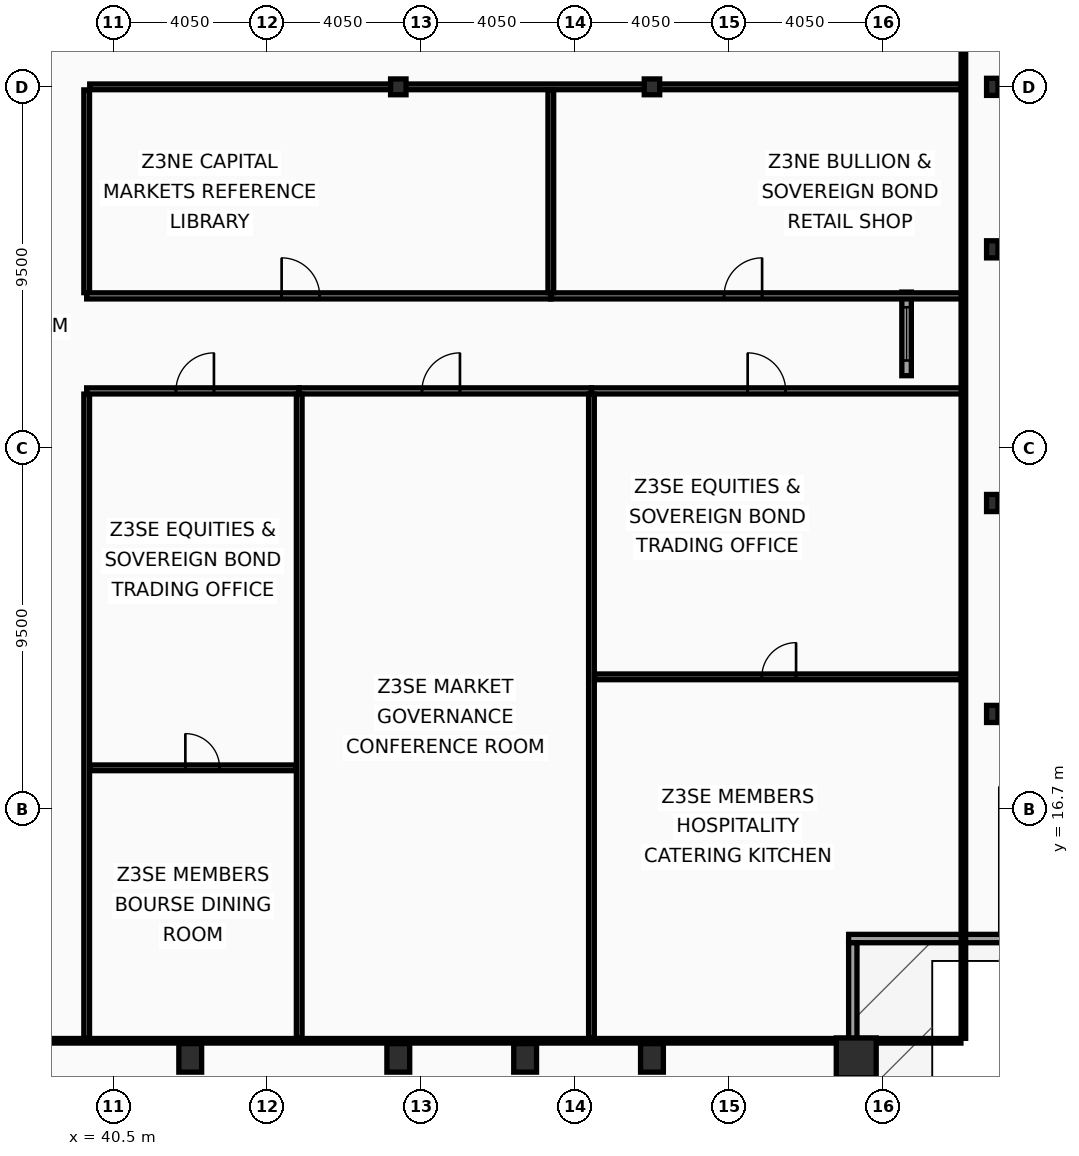
"""IFC4 building model, lengths in metres.
Left out: names, types, materials, properties, quantities, classifications, styles, units other than length and angle.
Written with IfcOpenShell. Run it as: python <this file> out.ifc"""

import sys

from ifc_helpers import new_model, si_unit, direction, frame, frame_2d, origin, origin_2d, place, context, subcontext, project, spatial, rectangle, hollow_rectangle, i_section, extrude, element, fill, save


model = new_model("IFC4")
c1 = context("Model", 3, precision=1e-05, world=origin(), true_north=direction((0.0, 1.0)))
c2 = subcontext(c1, "Body", "Model", "MODEL_VIEW")
j1 = project(units=[si_unit("LENGTHUNIT", "METRE"), si_unit("PLANEANGLEUNIT", "RADIAN")], contexts=[c1])
p1 = place(None, origin())
s1 = spatial("IfcSite", under=j1, at=p1, CompositionType="ELEMENT")
p2 = place(p1, origin())
s2 = spatial("IfcBuilding", under=s1, at=p2, CompositionType="ELEMENT")
p3 = place(p2, frame((0.0, 0.0, 239.0)))
s3 = spatial("IfcBuildingStorey", under=s2, at=p3, CompositionType="ELEMENT", Elevation=239.0)
p4 = place(p3, frame((60.05, 10.15, 0.0), z_axis=(0.0, 0.0, 1.0), x_axis=(1.0, 0.0, 0.0)))
e1 = element("IfcColumn", 1, at=p4, inside=s3, PredefinedType="COLUMN", context=c2, shape_type="SweptSolid", body=[
    extrude(hollow_rectangle(XDim=1.05, YDim=1.05, WallThickness=0.055, at=origin_2d()), origin(), (0.0, 0.0, 1.0), 3.6),
])
for number, where, z_axis, x_axis in (
    (2, (42.525, 10.15, 0.0), (0.0, 0.0, 1.0), (1.0, 0.0, 0.0)),
    (3, (48.0, 10.15, 0.0), (0.0, 0.0, 1.0), (1.0, 0.0, 0.0)),
    (4, (51.337, 10.15, 0.0), (0.0, 0.0, 1.0), (1.0, 0.0, 0.0)),
    (5, (54.675, 10.15, 0.0), (0.0, 0.0, 1.0), (1.0, 0.0, 0.0)),
):
    element("IfcColumn", number, at=place(p3, frame(where, z_axis=z_axis, x_axis=x_axis)), inside=s3, PredefinedType="COLUMN", context=c2, shape_type="SweptSolid", body=[
        extrude(hollow_rectangle(XDim=0.6, YDim=0.75, WallThickness=0.045, at=origin_2d()), origin(), (0.0, 0.0, 1.0), 3.6),
    ])
for number, where, z_axis, x_axis in (
    (6, (63.63, 19.2, 0.0), (0.0, 0.0, 1.0), (1.0, 0.0, 0.0)),
    (7, (63.63, 24.75, 0.0), (0.0, 0.0, 1.0), (1.0, 0.0, 0.0)),
    (8, (63.63, 31.425, 0.0), (0.0, 0.0, 1.0), (1.0, 0.0, 0.0)),
    (9, (63.63, 35.7, 0.0), (0.0, 0.0, 1.0), (1.0, 0.0, 0.0)),
):
    element("IfcColumn", number, at=place(p3, frame(where, z_axis=z_axis, x_axis=x_axis)), inside=s3, PredefinedType="COLUMN", context=c2, shape_type="SweptSolid", body=[
        extrude(i_section(OverallWidth=0.3, OverallDepth=0.45, WebThickness=0.014, FlangeThickness=0.026, at=origin_2d()), origin(), (0.0, 0.0, 1.0), 3.6),
    ])
for number, where, z_axis, x_axis in (
    (10, (48.0, 35.7, 0.0), (0.0, 0.0, 1.0), (1.0, 0.0, 0.0)),
    (11, (54.675, 35.7, 0.0), (0.0, 0.0, 1.0), (1.0, 0.0, 0.0)),
):
    element("IfcColumn", number, at=place(p3, frame(where, z_axis=z_axis, x_axis=x_axis)), inside=s3, PredefinedType="COLUMN", context=c2, shape_type="SweptSolid", body=[
        extrude(i_section(OverallWidth=0.406, OverallDepth=0.416, WebThickness=0.03, FlangeThickness=0.048, at=origin_2d()), origin(), (0.0, 0.0, 1.0), 3.6),
    ])
p5 = place(p3, frame((64.07, 13.29, 0.0), z_axis=(0.0, 0.0, 1.0), x_axis=(-1.0, 0.0, 0.0)))
e12 = element("IfcWall", 12, at=p5, inside=s3, PredefinedType="SOLIDWALL", context=c2, shape_type="SweptSolid", body=[
    extrude(rectangle(XDim=4.22, YDim=0.22, at=frame_2d((2.11, 0.0))), origin(), (0.0, 0.0, 1.0), 2.83),
])
p6 = place(p3, frame((59.96, 13.18, 0.0), z_axis=(0.0, 0.0, 1.0), x_axis=(0.0, -1.0, 0.0)))
e13 = element("IfcWall", 13, at=p6, inside=s3, PredefinedType="SOLIDWALL", context=c2, shape_type="SweptSolid", body=[
    extrude(rectangle(XDim=3.91, YDim=0.22, at=frame_2d((1.955, 0.0))), origin(), (0.0, 0.0, 1.0), 2.83),
])
p7 = place(p3, frame((61.375, 28.1, 0.0), z_axis=(0.0, 0.0, 1.0), x_axis=(0.0, 1.0, 0.0)))
e14 = element("IfcWall", 14, at=p7, inside=s3, PredefinedType="PARAPET", context=c2, shape_type="SweptSolid", body=[
    extrude(rectangle(XDim=2.2, YDim=0.25, at=frame_2d((1.1, 0.0))), origin(), (0.0, 0.0, 1.0), 0.88),
])
p8 = place(p7, frame((0.4, 0.0, 0.16)))
e15 = element("IfcOpeningElement", 15, at=p8, cuts=e14, PredefinedType="OPENING", context=c2, shape_type="SweptSolid", body=[
    extrude(rectangle(XDim=1.4, YDim=0.5, at=frame_2d((0.7, 0.25))), frame((0.0, 0.135, 0.0), z_axis=(0.0, -1.0, 0.0), x_axis=(1.0, 0.0, 0.0)), (0.0, 0.0, 1.0), 0.27),
])
p9 = place(p3, frame((39.8, 10.665, 0.0), z_axis=(0.0, 0.0, 1.0), x_axis=(0.0, 1.0, 0.0)))
e16 = element("IfcWall", 16, at=p9, inside=s3, PredefinedType="PARTITIONING", context=c2, shape_type="SweptSolid", body=[
    extrude(rectangle(XDim=16.95, YDim=0.15, at=frame_2d((8.475, 0.0))), origin(), (0.0, 0.0, 1.0), 2.98),
])
p10 = place(p3, frame((39.8, 30.285, 0.0), z_axis=(0.0, 0.0, 1.0), x_axis=(0.0, 1.0, 0.0)))
e17 = element("IfcWall", 17, at=p10, inside=s3, PredefinedType="PARTITIONING", context=c2, shape_type="SweptSolid", body=[
    extrude(rectangle(XDim=5.335, YDim=0.15, at=frame_2d((2.667, 0.0))), origin(), (0.0, 0.0, 1.0), 2.98),
])
p11 = place(p3, frame((39.88, 35.7, 0.0), z_axis=(0.0, 0.0, 1.0), x_axis=(1.0, 0.0, 0.0)))
e18 = element("IfcWall", 18, at=p11, inside=s3, PredefinedType="PARTITIONING", context=c2, shape_type="SweptSolid", body=[
    extrude(rectangle(XDim=22.925, YDim=0.15, at=frame_2d((11.462, 0.0))), origin(), (0.0, 0.0, 1.0), 2.78),
])
p12 = place(p3, frame((39.8, 27.7, 0.0), z_axis=(0.0, 0.0, 1.0), x_axis=(1.0, 0.0, 0.0)))
e19 = element("IfcWall", 19, at=p12, inside=s3, PredefinedType="PARTITIONING", context=c2, shape_type="SweptSolid", body=[
    extrude(rectangle(XDim=5.593, YDim=0.16, at=frame_2d((2.796, 0.0))), origin(), (0.0, 0.0, 1.0), 2.78),
])
p13 = place(p12, frame((2.349, 0.0, 0.0)))
e20 = element("IfcOpeningElement", 20, at=p13, cuts=e19, PredefinedType="OPENING", context=c2, shape_type="SweptSolid", body=[
    extrude(rectangle(XDim=1.0, YDim=2.05, at=frame_2d((0.5, 1.025))), frame((0.0, 0.09, 0.0), z_axis=(0.0, -1.0, 0.0), x_axis=(1.0, 0.0, 0.0)), (0.0, 0.0, 1.0), 0.18),
])
p14 = place(p3, frame((39.88, 17.782, 0.0), z_axis=(0.0, 0.0, 1.0), x_axis=(1.0, 0.0, 0.0)))
e21 = element("IfcWall", 21, at=p14, inside=s3, PredefinedType="PARTITIONING", context=c2, shape_type="SweptSolid", body=[
    extrude(rectangle(XDim=5.433, YDim=0.15, at=frame_2d((2.716, 0.0))), origin(), (0.0, 0.0, 1.0), 2.78),
])
p15 = place(p14, frame((2.517, 0.0, 0.0)))
e22 = element("IfcOpeningElement", 22, at=p15, cuts=e21, PredefinedType="OPENING", context=c2, shape_type="SweptSolid", body=[
    extrude(rectangle(XDim=0.9, YDim=2.05, at=frame_2d((0.45, 1.025))), frame((0.0, 0.085, 0.0), z_axis=(0.0, -1.0, 0.0), x_axis=(1.0, 0.0, 0.0)), (0.0, 0.0, 1.0), 0.17),
])
p16 = place(p3, frame((45.393, 27.7, 0.0), z_axis=(0.0, 0.0, 1.0), x_axis=(1.0, 0.0, 0.0)))
e23 = element("IfcWall", 23, at=p16, inside=s3, PredefinedType="PARTITIONING", context=c2, shape_type="SweptSolid", body=[
    extrude(rectangle(XDim=7.69, YDim=0.16, at=frame_2d((3.845, 0.0))), origin(), (0.0, 0.0, 1.0), 2.78),
])
p17 = place(p16, frame((3.23, 0.0, 0.0)))
e24 = element("IfcOpeningElement", 24, at=p17, cuts=e23, PredefinedType="OPENING", context=c2, shape_type="SweptSolid", body=[
    extrude(rectangle(XDim=1.0, YDim=2.05, at=frame_2d((0.5, 1.025))), frame((0.0, 0.09, 0.0), z_axis=(0.0, -1.0, 0.0), x_axis=(1.0, 0.0, 0.0)), (0.0, 0.0, 1.0), 0.18),
])
p18 = place(p3, frame((45.393, 10.665, 0.0), z_axis=(0.0, 0.0, 1.0), x_axis=(0.0, 1.0, 0.0)))
e25 = element("IfcWall", 25, at=p18, inside=s3, PredefinedType="PARTITIONING", context=c2, shape_type="SweptSolid", body=[
    extrude(rectangle(XDim=16.95, YDim=0.15, at=frame_2d((8.475, 0.0))), origin(), (0.0, 0.0, 1.0), 2.98),
])
p19 = place(p3, frame((53.083, 27.7, 0.0), z_axis=(0.0, 0.0, 1.0), x_axis=(1.0, 0.0, 0.0)))
e26 = element("IfcWall", 26, at=p19, inside=s3, PredefinedType="PARTITIONING", context=c2, shape_type="SweptSolid", body=[
    extrude(rectangle(XDim=9.787, YDim=0.16, at=frame_2d((4.894, 0.0))), origin(), (0.0, 0.0, 1.0), 2.78),
])
p20 = place(p19, frame((4.111, 0.0, 0.0)))
e27 = element("IfcOpeningElement", 27, at=p20, cuts=e26, PredefinedType="OPENING", context=c2, shape_type="SweptSolid", body=[
    extrude(rectangle(XDim=1.0, YDim=2.05, at=frame_2d((0.5, 1.025))), frame((0.0, 0.09, 0.0), z_axis=(0.0, -1.0, 0.0), x_axis=(1.0, 0.0, 0.0)), (0.0, 0.0, 1.0), 0.18),
])
p21 = place(p3, frame((53.083, 10.665, 0.0), z_axis=(0.0, 0.0, 1.0), x_axis=(0.0, 1.0, 0.0)))
e28 = element("IfcWall", 28, at=p21, inside=s3, PredefinedType="PARTITIONING", context=c2, shape_type="SweptSolid", body=[
    extrude(rectangle(XDim=16.95, YDim=0.15, at=frame_2d((8.475, 0.0))), origin(), (0.0, 0.0, 1.0), 2.98),
])
p22 = place(p3, frame((53.163, 20.176, 0.0), z_axis=(0.0, 0.0, 1.0), x_axis=(1.0, 0.0, 0.0)))
e29 = element("IfcWall", 29, at=p22, inside=s3, PredefinedType="PARTITIONING", context=c2, shape_type="SweptSolid", body=[
    extrude(rectangle(XDim=9.642, YDim=0.15, at=frame_2d((4.821, 0.0))), origin(), (0.0, 0.0, 1.0), 2.78),
])
p23 = place(p22, frame((4.404, 0.0, 0.0)))
e30 = element("IfcOpeningElement", 30, at=p23, cuts=e29, PredefinedType="OPENING", context=c2, shape_type="SweptSolid", body=[
    extrude(rectangle(XDim=0.9, YDim=2.05, at=frame_2d((0.45, 1.025))), frame((0.0, 0.085, 0.0), z_axis=(0.0, -1.0, 0.0), x_axis=(1.0, 0.0, 0.0)), (0.0, 0.0, 1.0), 0.17),
])
p24 = place(p3, frame((39.8, 30.2, 0.0), z_axis=(0.0, 0.0, 1.0), x_axis=(1.0, 0.0, 0.0)))
e31 = element("IfcWall", 31, at=p24, inside=s3, PredefinedType="PARTITIONING", context=c2, shape_type="SweptSolid", body=[
    extrude(rectangle(XDim=12.213, YDim=0.16, at=frame_2d((6.107, 0.0))), origin(), (0.0, 0.0, 1.0), 2.78),
])
p25 = place(p24, frame((5.13, 0.0, 0.0)))
e32 = element("IfcOpeningElement", 32, at=p25, cuts=e31, PredefinedType="OPENING", context=c2, shape_type="SweptSolid", body=[
    extrude(rectangle(XDim=1.0, YDim=2.05, at=frame_2d((0.5, 1.025))), frame((0.0, 0.09, 0.0), z_axis=(0.0, -1.0, 0.0), x_axis=(1.0, 0.0, 0.0)), (0.0, 0.0, 1.0), 0.18),
])
p26 = place(p3, frame((52.013, 30.2, 0.0), z_axis=(0.0, 0.0, 1.0), x_axis=(1.0, 0.0, 0.0)))
e33 = element("IfcWall", 33, at=p26, inside=s3, PredefinedType="PARTITIONING", context=c2, shape_type="SweptSolid", body=[
    extrude(rectangle(XDim=10.857, YDim=0.16, at=frame_2d((5.428, 0.0))), origin(), (0.0, 0.0, 1.0), 2.78),
])
p27 = place(p26, frame((4.56, 0.0, 0.0)))
e34 = element("IfcOpeningElement", 34, at=p27, cuts=e33, PredefinedType="OPENING", context=c2, shape_type="SweptSolid", body=[
    extrude(rectangle(XDim=1.0, YDim=2.05, at=frame_2d((0.5, 1.025))), frame((0.0, 0.09, 0.0), z_axis=(0.0, -1.0, 0.0), x_axis=(1.0, 0.0, 0.0)), (0.0, 0.0, 1.0), 0.18),
])
p28 = place(p3, frame((52.013, 30.285, 0.0), z_axis=(0.0, 0.0, 1.0), x_axis=(0.0, 1.0, 0.0)))
e35 = element("IfcWall", 35, at=p28, inside=s3, PredefinedType="PARTITIONING", context=c2, shape_type="SweptSolid", body=[
    extrude(rectangle(XDim=5.335, YDim=0.15, at=frame_2d((2.667, 0.0))), origin(), (0.0, 0.0, 1.0), 2.98),
])
p29 = place(p3, frame((62.87, 10.665, 0.0), z_axis=(0.0, 0.0, 1.0), x_axis=(0.0, 1.0, 0.0)))
e36 = element("IfcWall", 36, at=p29, inside=s3, PredefinedType="PARTITIONING", context=c2, shape_type="SweptSolid", body=[
    extrude(rectangle(XDim=42.11, YDim=0.12, at=frame_2d((21.055, 0.0))), origin(), (0.0, 0.0, 1.0), 2.78),
])
p30 = place(p3, frame((10.095, 10.6, 0.0), z_axis=(0.0, 0.0, 1.0), x_axis=(1.0, 0.0, 0.0)))
e37 = element("IfcWall", 37, at=p30, inside=s3, PredefinedType="PARTITIONING", context=c2, shape_type="SweptSolid", body=[
    extrude(rectangle(XDim=52.71, YDim=0.12, at=frame_2d((26.355, 0.0))), origin(), (0.0, 0.0, 1.0), 2.78),
])
p31 = place(p8, origin())
e38 = element("IfcWindow", 38, at=p31, inside=s3, PartitioningType="SINGLE_PANEL", PredefinedType="SKYLIGHT", context=c2, shape_type="SweptSolid", body=[
    extrude(rectangle(XDim=1.4, YDim=0.5, at=frame_2d((0.7, 0.25))), frame((0.0, 0.03, 0.0), z_axis=(0.0, -1.0, 0.0), x_axis=(1.0, 0.0, 0.0)), (0.0, 0.0, 1.0), 0.06),
])
fill(e15, e38)
p32 = place(p13, origin())
e39 = element("IfcDoor", 39, at=p32, inside=s3, OperationType="SINGLE_SWING_RIGHT", PredefinedType="DOOR", context=c2, shape_type="SweptSolid", body=[
    extrude(rectangle(XDim=1.0, YDim=2.05, at=frame_2d((0.5, 1.025))), frame((0.0, 0.025, 0.0), z_axis=(0.0, -1.0, 0.0), x_axis=(1.0, 0.0, 0.0)), (0.0, 0.0, 1.0), 0.05),
])
fill(e20, e39)
p33 = place(p15, origin())
e40 = element("IfcDoor", 40, at=p33, inside=s3, OperationType="SINGLE_SWING_LEFT", PredefinedType="DOOR", context=c2, shape_type="SweptSolid", body=[
    extrude(rectangle(XDim=0.9, YDim=2.05, at=frame_2d((0.45, 1.025))), frame((0.0, 0.025, 0.0), z_axis=(0.0, -1.0, 0.0), x_axis=(1.0, 0.0, 0.0)), (0.0, 0.0, 1.0), 0.05),
])
fill(e22, e40)
p34 = place(p17, origin())
e41 = element("IfcDoor", 41, at=p34, inside=s3, OperationType="SINGLE_SWING_RIGHT", PredefinedType="DOOR", context=c2, shape_type="SweptSolid", body=[
    extrude(rectangle(XDim=1.0, YDim=2.05, at=frame_2d((0.5, 1.025))), frame((0.0, 0.025, 0.0), z_axis=(0.0, -1.0, 0.0), x_axis=(1.0, 0.0, 0.0)), (0.0, 0.0, 1.0), 0.05),
])
fill(e24, e41)
p35 = place(p20, origin())
e42 = element("IfcDoor", 42, at=p35, inside=s3, OperationType="SINGLE_SWING_LEFT", PredefinedType="DOOR", context=c2, shape_type="SweptSolid", body=[
    extrude(rectangle(XDim=1.0, YDim=2.05, at=frame_2d((0.5, 1.025))), frame((0.0, 0.025, 0.0), z_axis=(0.0, -1.0, 0.0), x_axis=(1.0, 0.0, 0.0)), (0.0, 0.0, 1.0), 0.05),
])
fill(e27, e42)
p36 = place(p23, origin())
e43 = element("IfcDoor", 43, at=p36, inside=s3, OperationType="SINGLE_SWING_RIGHT", PredefinedType="DOOR", context=c2, shape_type="SweptSolid", body=[
    extrude(rectangle(XDim=0.9, YDim=2.05, at=frame_2d((0.45, 1.025))), frame((0.0, 0.025, 0.0), z_axis=(0.0, -1.0, 0.0), x_axis=(1.0, 0.0, 0.0)), (0.0, 0.0, 1.0), 0.05),
])
fill(e30, e43)
p37 = place(p25, origin())
e44 = element("IfcDoor", 44, at=p37, inside=s3, OperationType="SINGLE_SWING_LEFT", PredefinedType="DOOR", context=c2, shape_type="SweptSolid", body=[
    extrude(rectangle(XDim=1.0, YDim=2.05, at=frame_2d((0.5, 1.025))), frame((0.0, 0.025, 0.0), z_axis=(0.0, -1.0, 0.0), x_axis=(1.0, 0.0, 0.0)), (0.0, 0.0, 1.0), 0.05),
])
fill(e32, e44)
p38 = place(p27, origin())
e45 = element("IfcDoor", 45, at=p38, inside=s3, OperationType="SINGLE_SWING_RIGHT", PredefinedType="DOOR", context=c2, shape_type="SweptSolid", body=[
    extrude(rectangle(XDim=1.0, YDim=2.05, at=frame_2d((0.5, 1.025))), frame((0.0, 0.025, 0.0), z_axis=(0.0, -1.0, 0.0), x_axis=(1.0, 0.0, 0.0)), (0.0, 0.0, 1.0), 0.05),
])
fill(e34, e45)
save(model, sys.argv[1])
